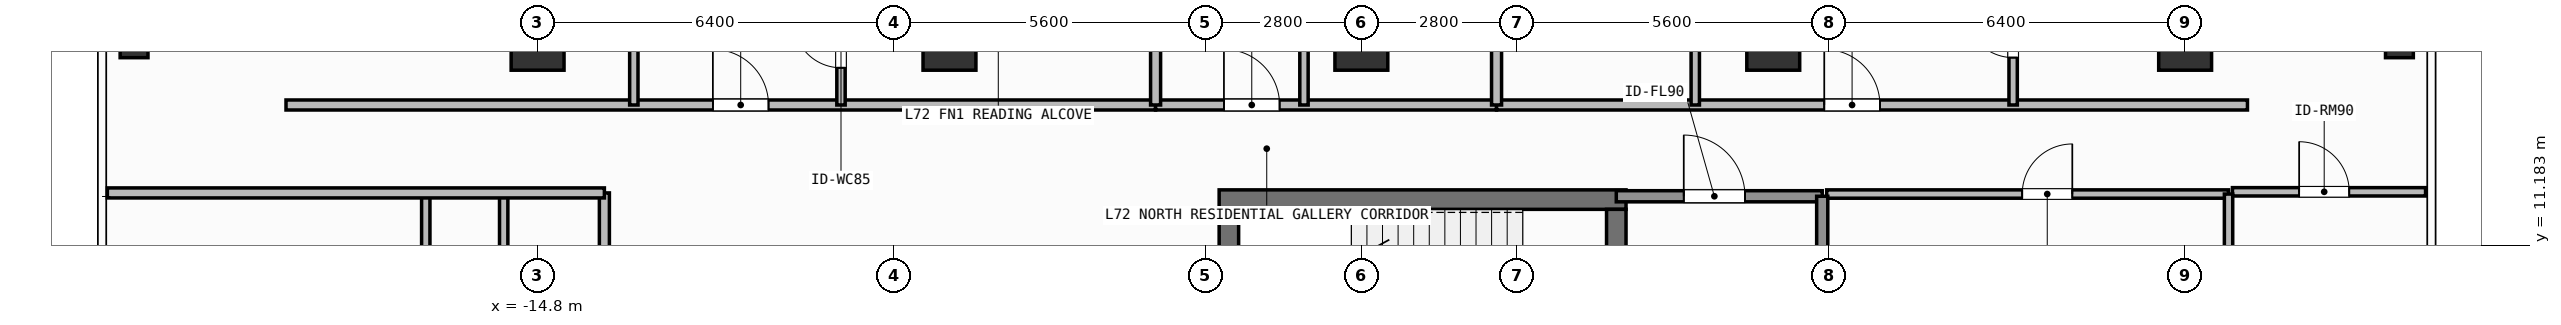
"""IFC4 building model, lengths in metres.
Left out: names, types, materials, properties, quantities, classifications, styles, units other than length and angle.
Written with IfcOpenShell. Run it as: python <this file> out.ifc"""

import sys

from ifc_helpers import new_model, si_unit, direction, frame, frame_2d, origin, origin_2d, place, context, subcontext, project, spatial, rectangle, hollow_rectangle, extrude, element, fill, save


model = new_model("IFC4")
c1 = context("Model", 3, precision=1e-05, world=origin(), true_north=direction((0.0, 1.0)))
c2 = subcontext(c1, "Body", "Model", "MODEL_VIEW")
j1 = project(units=[si_unit("LENGTHUNIT", "METRE"), si_unit("PLANEANGLEUNIT", "RADIAN")], contexts=[c1])
p1 = place(None, origin())
s1 = spatial("IfcSite", under=j1, at=p1, CompositionType="ELEMENT")
p2 = place(p1, origin())
s2 = spatial("IfcBuilding", under=s1, at=p2, CompositionType="ELEMENT")
p3 = place(p2, frame((0.0, 0.0, 293.7)))
s3 = spatial("IfcBuildingStorey", under=s2, at=p3, CompositionType="ELEMENT", Elevation=293.7)
p4 = place(p3, frame((-2.555, 12.0, 0.0), z_axis=(0.0, 0.0, 1.0), x_axis=(1.0, 0.0, 0.0)))
e1 = element("IfcWall", 1, at=p4, inside=s3, PredefinedType="SHEAR", context=c2, shape_type="SweptSolid", body=[
    extrude(rectangle(XDim=7.31, YDim=0.35, at=frame_2d((3.655, 0.0))), origin(), (0.0, 0.0, 1.0), 3.9),
])
p5 = place(p3, frame((-2.38, 8.9, 0.0), z_axis=(0.0, 0.0, 1.0), x_axis=(0.0, 1.0, 0.0)))
e2 = element("IfcWall", 2, at=p5, inside=s3, PredefinedType="SHEAR", context=c2, shape_type="SweptSolid", body=[
    extrude(rectangle(XDim=2.925, YDim=0.35, at=frame_2d((1.462, 0.0))), origin(), (0.0, 0.0, 1.0), 3.9),
])
p6 = place(p3, frame((4.58, 11.825, 0.0), z_axis=(0.0, 0.0, 1.0), x_axis=(0.0, -1.0, 0.0)))
e3 = element("IfcWall", 3, at=p6, inside=s3, PredefinedType="SHEAR", context=c2, shape_type="SweptSolid", body=[
    extrude(rectangle(XDim=2.925, YDim=0.35, at=frame_2d((1.462, 0.0))), origin(), (0.0, 0.0, 1.0), 3.9),
])
p7 = place(p6, frame((0.913, 0.0, 0.0)))
e4 = element("IfcOpeningElement", 4, at=p7, cuts=e3, PredefinedType="OPENING", context=c2, shape_type="SweptSolid", body=[
    extrude(rectangle(XDim=1.1, YDim=2.15, at=frame_2d((0.55, 1.075))), frame((0.0, 0.185, 0.0), z_axis=(0.0, -1.0, 0.0), x_axis=(1.0, 0.0, 0.0)), (0.0, 0.0, 1.0), 0.37),
])
for number, where, z_axis, x_axis in (
    (5, (-14.8, 14.8, 0.0), (0.0, 0.0, 1.0), (1.0, 0.0, 0.0)),
    (6, (-7.4, 14.8, 0.0), (0.0, 0.0, 1.0), (1.0, 0.0, 0.0)),
    (7, (0.0, 14.8, 0.0), (0.0, 0.0, 1.0), (1.0, 0.0, 0.0)),
    (8, (7.4, 14.8, 0.0), (0.0, 0.0, 1.0), (1.0, 0.0, 0.0)),
    (9, (14.8, 14.8, 0.0), (0.0, 0.0, 1.0), (1.0, 0.0, 0.0)),
):
    element("IfcColumn", number, at=place(p3, frame(where, z_axis=z_axis, x_axis=x_axis)), inside=s3, PredefinedType="COLUMN", context=c2, shape_type="SweptSolid", body=[
        extrude(rectangle(XDim=0.95, YDim=0.95, at=origin_2d()), origin(), (0.0, 0.0, 1.0), 3.9),
    ])
for number, where, z_axis, x_axis in (
    (10, (-22.05, 14.8, 0.0), (0.0, 0.0, 1.0), (1.0, 0.0, 0.0)),
    (11, (18.65, 14.8, 0.0), (0.0, 0.0, 1.0), (1.0, 0.0, 0.0)),
):
    element("IfcColumn", number, at=place(p3, frame(where, z_axis=z_axis, x_axis=x_axis)), inside=s3, PredefinedType="COLUMN", context=c2, shape_type="SweptSolid", body=[
        extrude(hollow_rectangle(XDim=0.5, YDim=0.5, WallThickness=0.025, at=origin_2d()), origin(), (0.0, 0.0, 1.0), 3.9),
    ])
p8 = place(p3, frame((4.58, 12.06, 0.0), z_axis=(0.0, 0.0, 1.0), x_axis=(1.0, 0.0, 0.0)))
e12 = element("IfcWall", 12, at=p8, inside=s3, PredefinedType="SOLIDWALL", context=c2, shape_type="SweptSolid", body=[
    extrude(rectangle(XDim=3.7, YDim=0.2, at=frame_2d((1.85, 0.0))), origin(), (0.0, 0.0, 1.0), 3.68),
])
p9 = place(p8, frame((1.212, 0.0, 0.0)))
e13 = element("IfcOpeningElement", 13, at=p9, cuts=e12, PredefinedType="OPENING", context=c2, shape_type="SweptSolid", body=[
    extrude(rectangle(XDim=1.1, YDim=2.15, at=frame_2d((0.55, 1.075))), frame((0.0, 0.11, 0.0), z_axis=(0.0, -1.0, 0.0), x_axis=(1.0, 0.0, 0.0)), (0.0, 0.0, 1.0), 0.22),
])
p10 = place(p3, frame((8.36, 12.1, 0.0), z_axis=(0.0, 0.0, 1.0), x_axis=(1.0, 0.0, 0.0)))
e14 = element("IfcWall", 14, at=p10, inside=s3, PredefinedType="PARTITIONING", context=c2, shape_type="SweptSolid", body=[
    extrude(rectangle(XDim=7.22, YDim=0.15, at=frame_2d((3.61, 0.0))), origin(), (0.0, 0.0, 1.0), 3.68),
])
p11 = place(p10, frame((3.513, 0.0, 0.0)))
e15 = element("IfcOpeningElement", 15, at=p11, cuts=e14, PredefinedType="OPENING", context=c2, shape_type="SweptSolid", body=[
    extrude(rectangle(XDim=0.9, YDim=2.1, at=frame_2d((0.45, 1.05))), frame((0.0, 0.085, 0.0), z_axis=(0.0, -1.0, 0.0), x_axis=(1.0, 0.0, 0.0)), (0.0, 0.0, 1.0), 0.17),
])
p12 = place(p3, frame((-19.32, 13.7, 0.0), z_axis=(0.0, 0.0, 1.0), x_axis=(1.0, 0.0, 0.0)))
e16 = element("IfcWall", 16, at=p12, inside=s3, PredefinedType="PARTITIONING", context=c2, shape_type="SweptSolid", body=[
    extrude(rectangle(XDim=15.623, YDim=0.18, at=frame_2d((7.812, 0.0))), origin(), (0.0, 0.0, 1.0), 3.68),
])
p13 = place(p12, frame((7.669, 0.0, 0.0)))
e17 = element("IfcOpeningElement", 17, at=p13, cuts=e16, PredefinedType="OPENING", context=c2, shape_type="SweptSolid", body=[
    extrude(rectangle(XDim=1.0, YDim=2.2, at=frame_2d((0.5, 1.1))), frame((0.0, 0.1, 0.0), z_axis=(0.0, -1.0, 0.0), x_axis=(1.0, 0.0, 0.0)), (0.0, 0.0, 1.0), 0.2),
])
p14 = place(p3, frame((-13.071, 13.7, 0.0), z_axis=(0.0, 0.0, 1.0), x_axis=(0.0, 1.0, 0.0)))
e18 = element("IfcWall", 18, at=p14, inside=s3, PredefinedType="PARTITIONING", context=c2, shape_type="SweptSolid", body=[
    extrude(rectangle(XDim=3.604, YDim=0.15, at=frame_2d((1.802, 0.0))), origin(), (0.0, 0.0, 1.0), 3.68),
])
p15 = place(p14, frame((1.725, 0.0, 0.0)))
e19 = element("IfcOpeningElement", 19, at=p15, cuts=e18, PredefinedType="OPENING", context=c2, shape_type="SweptSolid", body=[
    extrude(rectangle(XDim=0.85, YDim=2.1, at=frame_2d((0.425, 1.05))), frame((0.0, 0.085, 0.0), z_axis=(0.0, -1.0, 0.0), x_axis=(1.0, 0.0, 0.0)), (0.0, 0.0, 1.0), 0.17),
])
p16 = place(p3, frame((-9.349, 13.7, 0.0), z_axis=(0.0, 0.0, 1.0), x_axis=(0.0, 1.0, 0.0)))
e20 = element("IfcWall", 20, at=p16, inside=s3, PredefinedType="PARTITIONING", context=c2, shape_type="SweptSolid", body=[
    extrude(rectangle(XDim=2.018, YDim=0.15, at=frame_2d((1.009, 0.0))), origin(), (0.0, 0.0, 1.0), 3.68),
])
p17 = place(p16, frame((0.669, 0.0, 0.0)))
e21 = element("IfcOpeningElement", 21, at=p17, cuts=e20, PredefinedType="OPENING", context=c2, shape_type="SweptSolid", body=[
    extrude(rectangle(XDim=0.85, YDim=2.1, at=frame_2d((0.425, 1.05))), frame((0.0, 0.085, 0.0), z_axis=(0.0, -1.0, 0.0), x_axis=(1.0, 0.0, 0.0)), (0.0, 0.0, 1.0), 0.17),
])
p18 = place(p3, frame((-3.697, 13.7, 0.0), z_axis=(0.0, 0.0, 1.0), x_axis=(1.0, 0.0, 0.0)))
e22 = element("IfcWall", 22, at=p18, inside=s3, PredefinedType="PARTITIONING", context=c2, shape_type="SweptSolid", body=[
    extrude(rectangle(XDim=6.126, YDim=0.18, at=frame_2d((3.063, 0.0))), origin(), (0.0, 0.0, 1.0), 3.68),
])
p19 = place(p18, frame((1.228, 0.0, 0.0)))
e23 = element("IfcOpeningElement", 23, at=p19, cuts=e22, PredefinedType="OPENING", context=c2, shape_type="SweptSolid", body=[
    extrude(rectangle(XDim=1.0, YDim=2.2, at=frame_2d((0.5, 1.1))), frame((0.0, 0.1, 0.0), z_axis=(0.0, -1.0, 0.0), x_axis=(1.0, 0.0, 0.0)), (0.0, 0.0, 1.0), 0.2),
])
p20 = place(p3, frame((-1.031, 13.7, 0.0), z_axis=(0.0, 0.0, 1.0), x_axis=(0.0, 1.0, 0.0)))
e24 = element("IfcWall", 24, at=p20, inside=s3, PredefinedType="PARTITIONING", context=c2, shape_type="SweptSolid", body=[
    extrude(rectangle(XDim=2.281, YDim=0.15, at=frame_2d((1.141, 0.0))), origin(), (0.0, 0.0, 1.0), 3.68),
])
p21 = place(p3, frame((2.429, 13.7, 0.0), z_axis=(0.0, 0.0, 1.0), x_axis=(1.0, 0.0, 0.0)))
e25 = element("IfcWall", 25, at=p21, inside=s3, PredefinedType="PARTITIONING", context=c2, shape_type="SweptSolid", body=[
    extrude(rectangle(XDim=13.491, YDim=0.18, at=frame_2d((6.746, 0.0))), origin(), (0.0, 0.0, 1.0), 3.68),
])
p22 = place(p21, frame((5.887, 0.0, 0.0)))
e26 = element("IfcOpeningElement", 26, at=p22, cuts=e25, PredefinedType="OPENING", context=c2, shape_type="SweptSolid", body=[
    extrude(rectangle(XDim=1.0, YDim=2.2, at=frame_2d((0.5, 1.1))), frame((0.0, 0.1, 0.0), z_axis=(0.0, -1.0, 0.0), x_axis=(1.0, 0.0, 0.0)), (0.0, 0.0, 1.0), 0.2),
])
p23 = place(p3, frame((5.999, 13.7, 0.0), z_axis=(0.0, 0.0, 1.0), x_axis=(0.0, 1.0, 0.0)))
e27 = element("IfcWall", 27, at=p23, inside=s3, PredefinedType="PARTITIONING", context=c2, shape_type="SweptSolid", body=[
    extrude(rectangle(XDim=4.25, YDim=0.15, at=frame_2d((2.125, 0.0))), origin(), (0.0, 0.0, 1.0), 3.68),
])
p24 = place(p23, frame((1.7, 0.0, 0.0)))
e28 = element("IfcOpeningElement", 28, at=p24, cuts=e27, PredefinedType="OPENING", context=c2, shape_type="SweptSolid", body=[
    extrude(rectangle(XDim=0.85, YDim=2.1, at=frame_2d((0.425, 1.05))), frame((0.0, 0.085, 0.0), z_axis=(0.0, -1.0, 0.0), x_axis=(1.0, 0.0, 0.0)), (0.0, 0.0, 1.0), 0.17),
])
p25 = place(p3, frame((11.71, 13.7, 0.0), z_axis=(0.0, 0.0, 1.0), x_axis=(0.0, 1.0, 0.0)))
e29 = element("IfcWall", 29, at=p25, inside=s3, PredefinedType="PARTITIONING", context=c2, shape_type="SweptSolid", body=[
    extrude(rectangle(XDim=2.38, YDim=0.15, at=frame_2d((1.19, 0.0))), origin(), (0.0, 0.0, 1.0), 3.68),
])
p26 = place(p25, frame((0.851, 0.0, 0.0)))
e30 = element("IfcOpeningElement", 30, at=p26, cuts=e29, PredefinedType="OPENING", context=c2, shape_type="SweptSolid", body=[
    extrude(rectangle(XDim=0.85, YDim=2.1, at=frame_2d((0.425, 1.05))), frame((0.0, 0.085, 0.0), z_axis=(0.0, -1.0, 0.0), x_axis=(1.0, 0.0, 0.0)), (0.0, 0.0, 1.0), 0.17),
])
p27 = place(p3, frame((-13.6, 4.04, 0.0), z_axis=(0.0, 0.0, 1.0), x_axis=(0.0, 1.0, 0.0)))
e31 = element("IfcWall", 31, at=p27, inside=s3, PredefinedType="PARTITIONING", context=c2, shape_type="SweptSolid", body=[
    extrude(rectangle(XDim=8.08, YDim=0.18, at=frame_2d((4.04, 0.0))), origin(), (0.0, 0.0, 1.0), 3.68),
])
p28 = place(p27, frame((1.761, 0.0, 0.0)))
e32 = element("IfcOpeningElement", 32, at=p28, cuts=e31, PredefinedType="OPENING", context=c2, shape_type="SweptSolid", body=[
    extrude(rectangle(XDim=1.0, YDim=2.2, at=frame_2d((0.5, 1.1))), frame((0.0, 0.1, 0.0), z_axis=(0.0, -1.0, 0.0), x_axis=(1.0, 0.0, 0.0)), (0.0, 0.0, 1.0), 0.2),
])
p29 = place(p3, frame((15.65, 12.14, 0.0), z_axis=(0.0, 0.0, 1.0), x_axis=(1.0, 0.0, 0.0)))
e33 = element("IfcWall", 33, at=p29, inside=s3, PredefinedType="PARTITIONING", context=c2, shape_type="SweptSolid", body=[
    extrude(rectangle(XDim=3.47, YDim=0.15, at=frame_2d((1.735, 0.0))), origin(), (0.0, 0.0, 1.0), 3.68),
])
p30 = place(p29, frame((1.198, 0.0, 0.0)))
e34 = element("IfcOpeningElement", 34, at=p30, cuts=e33, PredefinedType="OPENING", context=c2, shape_type="SweptSolid", body=[
    extrude(rectangle(XDim=0.9, YDim=2.1, at=frame_2d((0.45, 1.05))), frame((0.0, 0.085, 0.0), z_axis=(0.0, -1.0, 0.0), x_axis=(1.0, 0.0, 0.0)), (0.0, 0.0, 1.0), 0.17),
])
p31 = place(p3, frame((8.28, 8.725, 0.0), z_axis=(0.0, 0.0, 1.0), x_axis=(0.0, 1.0, 0.0)))
e35 = element("IfcWall", 35, at=p31, inside=s3, PredefinedType="SOLIDWALL", context=c2, shape_type="SweptSolid", body=[
    extrude(rectangle(XDim=3.335, YDim=0.2, at=frame_2d((1.667, 0.0))), origin(), (0.0, 0.0, 1.0), 3.68),
])
p32 = place(p3, frame((15.58, 5.85, 0.0), z_axis=(0.0, 0.0, 1.0), x_axis=(0.0, 1.0, 0.0)))
e36 = element("IfcWall", 36, at=p32, inside=s3, PredefinedType="PARTITIONING", context=c2, shape_type="SweptSolid", body=[
    extrude(rectangle(XDim=6.25, YDim=0.15, at=frame_2d((3.125, 0.0))), origin(), (0.0, 0.0, 1.0), 3.68),
])
for number, where, z_axis, x_axis in (
    (37, (-3.697, 13.7, 0.0), (0.0, 0.0, 1.0), (0.0, 1.0, 0.0)),
    (38, (2.429, 13.7, 0.0), (0.0, 0.0, 1.0), (0.0, 1.0, 0.0)),
):
    element("IfcWall", number, at=place(p3, frame(where, z_axis=z_axis, x_axis=x_axis)), inside=s3, PredefinedType="PARTITIONING", context=c2, shape_type="SweptSolid", body=[
        extrude(rectangle(XDim=7.33, YDim=0.18, at=frame_2d((3.665, 0.0))), origin(), (0.0, 0.0, 1.0), 3.68),
    ])
for number, where, z_axis, x_axis in (
    (39, (-15.409, 9.32, 0.0), (0.0, 0.0, 1.0), (0.0, 1.0, 0.0)),
    (40, (-16.809, 9.32, 0.0), (0.0, 0.0, 1.0), (0.0, 1.0, 0.0)),
):
    element("IfcWall", number, at=place(p3, frame(where, z_axis=z_axis, x_axis=x_axis)), inside=s3, PredefinedType="PARTITIONING", context=c2, shape_type="SweptSolid", body=[
        extrude(rectangle(XDim=2.8, YDim=0.15, at=frame_2d((1.4, 0.0))), origin(), (0.0, 0.0, 1.0), 3.68),
    ])
p33 = place(p3, frame((-22.53, 12.12, 0.0), z_axis=(0.0, 0.0, 1.0), x_axis=(1.0, 0.0, 0.0)))
e41 = element("IfcWall", 41, at=p33, inside=s3, PredefinedType="PARTITIONING", context=c2, shape_type="SweptSolid", body=[
    extrude(rectangle(XDim=8.93, YDim=0.18, at=frame_2d((4.465, 0.0))), origin(), (0.0, 0.0, 1.0), 3.68),
])
p34 = place(p9, origin())
e42 = element("IfcDoor", 42, at=p34, inside=s3, OperationType="SINGLE_SWING_LEFT", PredefinedType="DOOR", context=c2, shape_type="SweptSolid", body=[
    extrude(rectangle(XDim=1.1, YDim=2.15, at=frame_2d((0.55, 1.075))), frame((0.0, 0.025, 0.0), z_axis=(0.0, -1.0, 0.0), x_axis=(1.0, 0.0, 0.0)), (0.0, 0.0, 1.0), 0.05),
])
fill(e13, e42)
p35 = place(p11, origin())
e43 = element("IfcDoor", 43, at=p35, inside=s3, OperationType="SINGLE_SWING_RIGHT", PredefinedType="DOOR", context=c2, shape_type="SweptSolid", body=[
    extrude(rectangle(XDim=0.9, YDim=2.1, at=frame_2d((0.45, 1.05))), frame((0.0, 0.025, 0.0), z_axis=(0.0, -1.0, 0.0), x_axis=(1.0, 0.0, 0.0)), (0.0, 0.0, 1.0), 0.05),
])
fill(e15, e43)
p36 = place(p13, origin())
e44 = element("IfcDoor", 44, at=p36, inside=s3, OperationType="SINGLE_SWING_LEFT", PredefinedType="DOOR", context=c2, shape_type="SweptSolid", body=[
    extrude(rectangle(XDim=1.0, YDim=2.2, at=frame_2d((0.5, 1.1))), frame((0.0, 0.025, 0.0), z_axis=(0.0, -1.0, 0.0), x_axis=(1.0, 0.0, 0.0)), (0.0, 0.0, 1.0), 0.05),
])
fill(e17, e44)
p37 = place(p17, origin())
e45 = element("IfcDoor", 45, at=p37, inside=s3, OperationType="SINGLE_SWING_RIGHT", PredefinedType="DOOR", context=c2, shape_type="SweptSolid", body=[
    extrude(rectangle(XDim=0.85, YDim=2.1, at=frame_2d((0.425, 1.05))), frame((0.0, 0.025, 0.0), z_axis=(0.0, -1.0, 0.0), x_axis=(1.0, 0.0, 0.0)), (0.0, 0.0, 1.0), 0.05),
])
fill(e21, e45)
p38 = place(p19, origin())
e46 = element("IfcDoor", 46, at=p38, inside=s3, OperationType="SINGLE_SWING_LEFT", PredefinedType="DOOR", context=c2, shape_type="SweptSolid", body=[
    extrude(rectangle(XDim=1.0, YDim=2.2, at=frame_2d((0.5, 1.1))), frame((0.0, 0.025, 0.0), z_axis=(0.0, -1.0, 0.0), x_axis=(1.0, 0.0, 0.0)), (0.0, 0.0, 1.0), 0.05),
])
fill(e23, e46)
p39 = place(p22, origin())
e47 = element("IfcDoor", 47, at=p39, inside=s3, OperationType="SINGLE_SWING_LEFT", PredefinedType="DOOR", context=c2, shape_type="SweptSolid", body=[
    extrude(rectangle(XDim=1.0, YDim=2.2, at=frame_2d((0.5, 1.1))), frame((0.0, 0.025, 0.0), z_axis=(0.0, -1.0, 0.0), x_axis=(1.0, 0.0, 0.0)), (0.0, 0.0, 1.0), 0.05),
])
fill(e26, e47)
p40 = place(p26, origin())
e48 = element("IfcDoor", 48, at=p40, inside=s3, OperationType="SINGLE_SWING_RIGHT", PredefinedType="DOOR", context=c2, shape_type="SweptSolid", body=[
    extrude(rectangle(XDim=0.85, YDim=2.1, at=frame_2d((0.425, 1.05))), frame((0.0, 0.025, 0.0), z_axis=(0.0, -1.0, 0.0), x_axis=(1.0, 0.0, 0.0)), (0.0, 0.0, 1.0), 0.05),
])
fill(e30, e48)
p41 = place(p30, origin())
e49 = element("IfcDoor", 49, at=p41, inside=s3, OperationType="SINGLE_SWING_LEFT", PredefinedType="DOOR", context=c2, shape_type="SweptSolid", body=[
    extrude(rectangle(XDim=0.9, YDim=2.1, at=frame_2d((0.45, 1.05))), frame((0.0, 0.025, 0.0), z_axis=(0.0, -1.0, 0.0), x_axis=(1.0, 0.0, 0.0)), (0.0, 0.0, 1.0), 0.05),
])
fill(e34, e49)
save(model, sys.argv[1])
